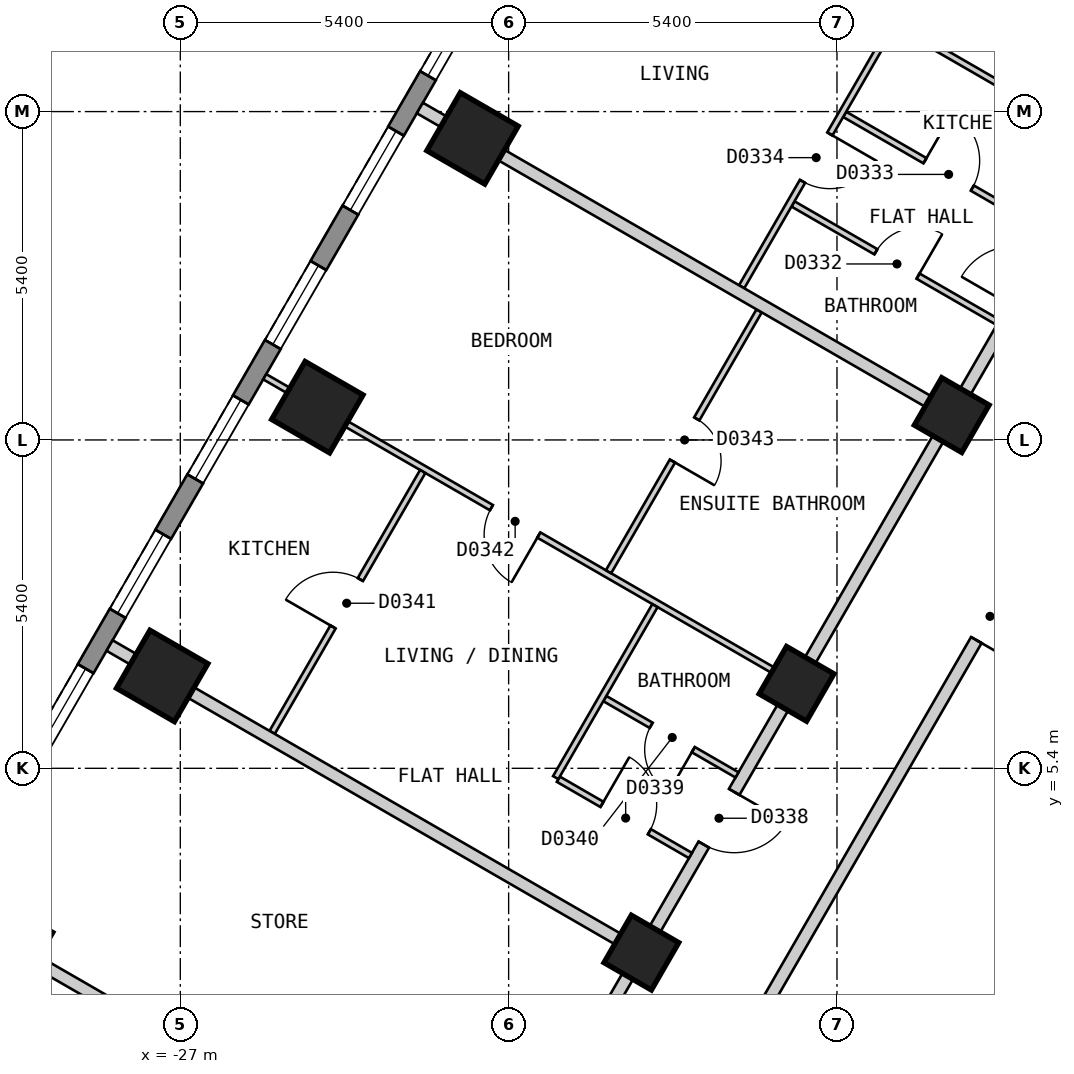
"""IFC4 building model, lengths in metres.
Left out: names, types, materials, properties, quantities, classifications, styles, units other than length and angle.
Written with IfcOpenShell. Run it as: python <this file> out.ifc"""

import sys

from ifc_helpers import new_model, si_unit, direction, frame, frame_2d, origin, origin_2d, place, context, subcontext, project, spatial, polyline, rectangle, outline, extrude, element, fill, save


model = new_model("IFC4")
c1 = context("Model", 3, precision=1e-05, world=origin(), true_north=direction((0.0, 1.0)))
c2 = subcontext(c1, "Body", "Model", "MODEL_VIEW")
j1 = project(units=[si_unit("LENGTHUNIT", "METRE"), si_unit("PLANEANGLEUNIT", "RADIAN")], contexts=[c1])
p1 = place(None, origin())
s1 = spatial("IfcSite", under=j1, at=p1, CompositionType="ELEMENT")
p2 = place(p1, origin())
s2 = spatial("IfcBuilding", under=s1, at=p2, CompositionType="ELEMENT")
p3 = place(p2, frame((0.0, 0.0, 59.4)))
s3 = spatial("IfcBuildingStorey", under=s2, at=p3, CompositionType="ELEMENT", Elevation=59.4)
for number, where, z_axis, x_axis in (
    (1, (-22.194, 15.759, 0.0), (0.0, 0.0, 1.0), (-0.5, -0.866, 0.0)),
    (2, (-24.746, 11.339, 0.0), (0.0, 0.0, 1.0), (-0.5, -0.866, 0.0)),
    (3, (-27.298, 6.919, 0.0), (0.0, 0.0, 1.0), (-0.5, -0.866, 0.0)),
    (4, (-29.849, 2.499, 0.0), (0.0, 0.0, 1.0), (-0.5, -0.866, 0.0)),
):
    element("IfcColumn", number, at=place(p3, frame(where, z_axis=z_axis, x_axis=x_axis)), inside=s3, PredefinedType="COLUMN", context=c2, shape_type="SweptSolid", body=[
        extrude(rectangle(XDim=1.1, YDim=1.1, at=origin_2d()), origin(), (0.0, 0.0, 1.0), 3.0),
    ])
for number, where, z_axis, x_axis in (
    (5, (-14.313, 11.209, 0.0), (0.0, 0.0, 1.0), (-0.5, -0.866, 0.0)),
    (6, (-16.865, 6.789, 0.0), (0.0, 0.0, 1.0), (-0.5, -0.866, 0.0)),
    (7, (-19.417, 2.369, 0.0), (0.0, 0.0, 1.0), (-0.5, -0.866, 0.0)),
):
    element("IfcColumn", number, at=place(p3, frame(where, z_axis=z_axis, x_axis=x_axis)), inside=s3, PredefinedType="COLUMN", context=c2, shape_type="SweptSolid", body=[
        extrude(rectangle(XDim=0.9, YDim=0.9, at=origin_2d()), origin(), (0.0, 0.0, 1.0), 3.0),
    ])
p4 = place(p3, frame((-17.71, 25.825, 0.0), z_axis=(0.0, 0.0, 1.0), x_axis=(-0.500001938803, -0.866024284413, 0.0)))
e8 = element("IfcWall", 8, at=p4, inside=s3, PredefinedType="SOLIDWALL", context=c2, shape_type="SweptSolid", body=[
    extrude(outline(polyline([(0.0, -0.15), (27.02, -0.15), (26.94, 0.15), (0.08, 0.15), (0.0, -0.15)])), origin(), (0.0, 0.0, 1.0), 2.6),
])
p5 = place(p4, frame((1.277, 0.0, 0.15)))
e9 = element("IfcOpeningElement", 9, at=p5, cuts=e8, PredefinedType="OPENING", context=c2, shape_type="SweptSolid", body=[
    extrude(rectangle(XDim=1.5, YDim=2.1, at=frame_2d((0.75, 1.05))), frame((0.0, 0.16, 0.0), z_axis=(0.0, -1.0, 0.0), x_axis=(1.0, 0.0, 0.0)), (0.0, 0.0, 1.0), 0.32),
])
p6 = place(p4, frame((3.829, 0.0, 0.15)))
e10 = element("IfcOpeningElement", 10, at=p6, cuts=e8, PredefinedType="OPENING", context=c2, shape_type="SweptSolid", body=[
    extrude(rectangle(XDim=1.5, YDim=2.1, at=frame_2d((0.75, 1.05))), frame((0.0, 0.16, 0.0), z_axis=(0.0, -1.0, 0.0), x_axis=(1.0, 0.0, 0.0)), (0.0, 0.0, 1.0), 0.32),
])
p7 = place(p4, frame((6.382, 0.0, 0.15)))
e11 = element("IfcOpeningElement", 11, at=p7, cuts=e8, PredefinedType="OPENING", context=c2, shape_type="SweptSolid", body=[
    extrude(rectangle(XDim=1.5, YDim=2.1, at=frame_2d((0.75, 1.05))), frame((0.0, 0.16, 0.0), z_axis=(0.0, -1.0, 0.0), x_axis=(1.0, 0.0, 0.0)), (0.0, 0.0, 1.0), 0.32),
])
p8 = place(p4, frame((8.933, 0.0, 0.15)))
e12 = element("IfcOpeningElement", 12, at=p8, cuts=e8, PredefinedType="OPENING", context=c2, shape_type="SweptSolid", body=[
    extrude(rectangle(XDim=1.5, YDim=2.1, at=frame_2d((0.75, 1.05))), frame((0.0, 0.16, 0.0), z_axis=(0.0, -1.0, 0.0), x_axis=(1.0, 0.0, 0.0)), (0.0, 0.0, 1.0), 0.32),
])
p9 = place(p4, frame((11.485, 0.0, 0.15)))
e13 = element("IfcOpeningElement", 13, at=p9, cuts=e8, PredefinedType="OPENING", context=c2, shape_type="SweptSolid", body=[
    extrude(rectangle(XDim=1.5, YDim=2.1, at=frame_2d((0.75, 1.05))), frame((0.0, 0.16, 0.0), z_axis=(0.0, -1.0, 0.0), x_axis=(1.0, 0.0, 0.0)), (0.0, 0.0, 1.0), 0.32),
])
p10 = place(p4, frame((14.037, 0.0, 0.15)))
e14 = element("IfcOpeningElement", 14, at=p10, cuts=e8, PredefinedType="OPENING", context=c2, shape_type="SweptSolid", body=[
    extrude(rectangle(XDim=1.5, YDim=2.1, at=frame_2d((0.75, 1.05))), frame((0.0, 0.16, 0.0), z_axis=(0.0, -1.0, 0.0), x_axis=(1.0, 0.0, 0.0)), (0.0, 0.0, 1.0), 0.32),
])
p11 = place(p4, frame((16.589, 0.0, 0.15)))
e15 = element("IfcOpeningElement", 15, at=p11, cuts=e8, PredefinedType="OPENING", context=c2, shape_type="SweptSolid", body=[
    extrude(rectangle(XDim=1.5, YDim=2.1, at=frame_2d((0.75, 1.05))), frame((0.0, 0.16, 0.0), z_axis=(0.0, -1.0, 0.0), x_axis=(1.0, 0.0, 0.0)), (0.0, 0.0, 1.0), 0.32),
])
p12 = place(p4, frame((19.141, 0.0, 0.15)))
e16 = element("IfcOpeningElement", 16, at=p12, cuts=e8, PredefinedType="OPENING", context=c2, shape_type="SweptSolid", body=[
    extrude(rectangle(XDim=1.5, YDim=2.1, at=frame_2d((0.75, 1.05))), frame((0.0, 0.16, 0.0), z_axis=(0.0, -1.0, 0.0), x_axis=(1.0, 0.0, 0.0)), (0.0, 0.0, 1.0), 0.32),
])
p13 = place(p4, frame((21.693, 0.0, 0.15)))
e17 = element("IfcOpeningElement", 17, at=p13, cuts=e8, PredefinedType="OPENING", context=c2, shape_type="SweptSolid", body=[
    extrude(rectangle(XDim=1.5, YDim=2.1, at=frame_2d((0.75, 1.05))), frame((0.0, 0.16, 0.0), z_axis=(0.0, -1.0, 0.0), x_axis=(1.0, 0.0, 0.0)), (0.0, 0.0, 1.0), 0.32),
])
p14 = place(p4, frame((24.244, 0.0, 0.15)))
e18 = element("IfcOpeningElement", 18, at=p14, cuts=e8, PredefinedType="OPENING", context=c2, shape_type="SweptSolid", body=[
    extrude(rectangle(XDim=1.5, YDim=2.1, at=frame_2d((0.75, 1.05))), frame((0.0, 0.16, 0.0), z_axis=(0.0, -1.0, 0.0), x_axis=(1.0, 0.0, 0.0)), (0.0, 0.0, 1.0), 0.32),
])
p15 = place(p3, frame((-18.244, -0.001, 0.0), z_axis=(0.0, 0.0, 1.0), x_axis=(0.499962999376, 0.866046765051, 0.0)))
e19 = element("IfcWall", 19, at=p15, inside=s3, PredefinedType="PARTITIONING", context=c2, shape_type="SweptSolid", body=[
    extrude(rectangle(XDim=18.245, YDim=0.2, at=frame_2d((9.123, 0.0))), origin(), (0.0, 0.0, 1.0), 2.6),
])
p16 = place(p15, frame((8.672, 0.0, 0.0)))
e20 = element("IfcOpeningElement", 20, at=p16, cuts=e19, PredefinedType="OPENING", context=c2, shape_type="SweptSolid", body=[
    extrude(rectangle(XDim=0.9, YDim=2.1, at=frame_2d((0.45, 1.05))), frame((0.0, 0.11, 0.0), z_axis=(0.0, -1.0, 0.0), x_axis=(1.0, 0.0, 0.0)), (0.0, 0.0, 1.0), 0.22),
])
p17 = place(p3, frame((-20.727, 0.099, 0.0), z_axis=(0.0, 0.0, 1.0), x_axis=(0.499993204491, 0.866029327138, 0.0)))
e21 = element("IfcWall", 21, at=p17, inside=s3, PredefinedType="PARTITIONING", context=c2, shape_type="SweptSolid", body=[
    extrude(rectangle(XDim=20.554, YDim=0.2, at=frame_2d((10.277, 0.0))), origin(), (0.0, 0.0, 1.0), 2.6),
])
p18 = place(p17, frame((14.88, 0.0, 0.0)))
e22 = element("IfcOpeningElement", 22, at=p18, cuts=e21, PredefinedType="OPENING", context=c2, shape_type="SweptSolid", body=[
    extrude(rectangle(XDim=1.0, YDim=2.1, at=frame_2d((0.5, 1.05))), frame((0.0, 0.11, 0.0), z_axis=(0.0, -1.0, 0.0), x_axis=(1.0, 0.0, 0.0)), (0.0, 0.0, 1.0), 0.22),
])
p19 = place(p17, frame((4.673, 0.0, 0.0)))
e23 = element("IfcOpeningElement", 23, at=p19, cuts=e21, PredefinedType="OPENING", context=c2, shape_type="SweptSolid", body=[
    extrude(rectangle(XDim=1.0, YDim=2.1, at=frame_2d((0.5, 1.05))), frame((0.0, 0.11, 0.0), z_axis=(0.0, -1.0, 0.0), x_axis=(1.0, 0.0, 0.0)), (0.0, 0.0, 1.0), 0.22),
])
p20 = place(p17, frame((0.838, 0.0, 0.0)))
e24 = element("IfcOpeningElement", 24, at=p20, cuts=e21, PredefinedType="OPENING", context=c2, shape_type="SweptSolid", body=[
    extrude(rectangle(XDim=0.8, YDim=2.1, at=frame_2d((0.4, 1.05))), frame((0.0, 0.11, 0.0), z_axis=(0.0, -1.0, 0.0), x_axis=(1.0, 0.0, 0.0)), (0.0, 0.0, 1.0), 0.22),
])
p21 = place(p3, frame((-20.018, 6.547, 0.0), z_axis=(0.0, 0.0, 1.0), x_axis=(0.866038211682, -0.499977815414, 0.0)))
e25 = element("IfcWall", 25, at=p21, inside=s3, PredefinedType="PARTITIONING", context=c2, shape_type="SweptSolid", body=[
    extrude(rectangle(XDim=2.51, YDim=0.1, at=frame_2d((1.255, 0.0))), origin(), (0.0, 0.0, 1.0), 2.6),
])
p22 = place(p21, frame((0.88, 0.0, 0.0)))
e26 = element("IfcOpeningElement", 26, at=p22, cuts=e25, PredefinedType="OPENING", context=c2, shape_type="SweptSolid", body=[
    extrude(rectangle(XDim=0.8, YDim=2.1, at=frame_2d((0.4, 1.05))), frame((0.0, 0.06, 0.0), z_axis=(0.0, -1.0, 0.0), x_axis=(1.0, 0.0, 0.0)), (0.0, 0.0, 1.0), 0.12),
])
p23 = place(p3, frame((-20.783, 5.221, 0.0), z_axis=(0.0, 0.0, 1.0), x_axis=(0.865958718457, -0.500115484592, 0.0)))
e27 = element("IfcWall", 27, at=p23, inside=s3, PredefinedType="PARTITIONING", context=c2, shape_type="SweptSolid", body=[
    extrude(rectangle(XDim=2.509, YDim=0.1, at=frame_2d((1.255, 0.0))), origin(), (0.0, 0.0, 1.0), 2.6),
])
p24 = place(p23, frame((0.829, 0.0, 0.0)))
e28 = element("IfcOpeningElement", 28, at=p24, cuts=e27, PredefinedType="OPENING", context=c2, shape_type="SweptSolid", body=[
    extrude(rectangle(XDim=0.9, YDim=2.1, at=frame_2d((0.45, 1.05))), frame((0.0, 0.06, 0.0), z_axis=(0.0, -1.0, 0.0), x_axis=(1.0, 0.0, 0.0)), (0.0, 0.0, 1.0), 0.12),
])
p25 = place(p3, frame((-25.611, 11.839, 0.0), z_axis=(0.0, 0.0, 1.0), x_axis=(0.866022959057, -0.500004234368, 0.0)))
e29 = element("IfcWall", 29, at=p25, inside=s3, PredefinedType="PARTITIONING", context=c2, shape_type="SweptSolid", body=[
    extrude(rectangle(XDim=10.0, YDim=0.1, at=frame_2d((5.0, 0.0))), origin(), (0.0, 0.0, 1.0), 2.6),
])
p26 = place(p25, frame((4.305, 0.0, 0.0)))
e30 = element("IfcOpeningElement", 30, at=p26, cuts=e29, PredefinedType="OPENING", context=c2, shape_type="SweptSolid", body=[
    extrude(rectangle(XDim=0.9, YDim=2.1, at=frame_2d((0.45, 1.05))), frame((0.0, 0.06, 0.0), z_axis=(0.0, -1.0, 0.0), x_axis=(1.0, 0.0, 0.0)), (0.0, 0.0, 1.0), 0.12),
])
p27 = place(p3, frame((-16.923, 14.681, 0.0), z_axis=(0.0, 0.0, 1.0), x_axis=(0.866087525071, -0.499892387336, 0.0)))
e31 = element("IfcWall", 31, at=p27, inside=s3, PredefinedType="PARTITIONING", context=c2, shape_type="SweptSolid", body=[
    extrude(rectangle(XDim=3.897, YDim=0.1, at=frame_2d((1.948, 0.0))), origin(), (0.0, 0.0, 1.0), 2.6),
])
p28 = place(p27, frame((1.574, 0.0, 0.0)))
e32 = element("IfcOpeningElement", 32, at=p28, cuts=e31, PredefinedType="OPENING", context=c2, shape_type="SweptSolid", body=[
    extrude(rectangle(XDim=0.8, YDim=2.1, at=frame_2d((0.4, 1.05))), frame((0.0, 0.06, 0.0), z_axis=(0.0, -1.0, 0.0), x_axis=(1.0, 0.0, 0.0)), (0.0, 0.0, 1.0), 0.12),
])
p29 = place(p3, frame((-16.073, 16.154, 0.0), z_axis=(0.0, 0.0, 1.0), x_axis=(0.865979019114, -0.500080332001, 0.0)))
e33 = element("IfcWall", 33, at=p29, inside=s3, PredefinedType="PARTITIONING", context=c2, shape_type="SweptSolid", body=[
    extrude(rectangle(XDim=3.897, YDim=0.1, at=frame_2d((1.949, 0.0))), origin(), (0.0, 0.0, 1.0), 2.6),
])
p30 = place(p29, frame((1.524, 0.0, 0.0)))
e34 = element("IfcOpeningElement", 34, at=p30, cuts=e33, PredefinedType="OPENING", context=c2, shape_type="SweptSolid", body=[
    extrude(rectangle(XDim=0.9, YDim=2.1, at=frame_2d((0.45, 1.05))), frame((0.0, 0.06, 0.0), z_axis=(0.0, -1.0, 0.0), x_axis=(1.0, 0.0, 0.0)), (0.0, 0.0, 1.0), 0.12),
])
p31 = place(p3, frame((-20.508, 20.679, 0.0), z_axis=(0.0, 0.0, 1.0), x_axis=(0.866047370643, -0.499961950354, 0.0)))
e35 = element("IfcWall", 35, at=p31, inside=s3, PredefinedType="PARTITIONING", context=c2, shape_type="SweptSolid", body=[
    extrude(rectangle(XDim=10.001, YDim=0.1, at=frame_2d((5.0, 0.0))), origin(), (0.0, 0.0, 1.0), 2.6),
])
p32 = place(p31, frame((2.576, 0.0, 0.0)))
e36 = element("IfcOpeningElement", 36, at=p32, cuts=e35, PredefinedType="OPENING", context=c2, shape_type="SweptSolid", body=[
    extrude(rectangle(XDim=0.9, YDim=2.1, at=frame_2d((0.45, 1.05))), frame((0.0, 0.06, 0.0), z_axis=(0.0, -1.0, 0.0), x_axis=(1.0, 0.0, 0.0)), (0.0, 0.0, 1.0), 0.12),
])
p33 = place(p3, frame((-20.826, 5.247, 0.0), z_axis=(0.0, 0.0, 1.0), x_axis=(0.499806605897, 0.866137031134, 0.0)))
e37 = element("IfcWall", 37, at=p33, inside=s3, PredefinedType="PARTITIONING", context=c2, shape_type="SweptSolid", body=[
    extrude(rectangle(XDim=3.265, YDim=0.1, at=frame_2d((1.632, 0.0))), origin(), (0.0, 0.0, 1.0), 2.6),
])
p34 = place(p3, frame((-19.957, 8.633, 0.0), z_axis=(0.0, 0.0, 1.0), x_axis=(0.499967111503, 0.866044391134, 0.0)))
e38 = element("IfcWall", 38, at=p34, inside=s3, PredefinedType="PARTITIONING", context=c2, shape_type="SweptSolid", body=[
    extrude(rectangle(XDim=4.952, YDim=0.1, at=frame_2d((2.476, 0.0))), origin(), (0.0, 0.0, 1.0), 2.6),
])
p35 = place(p34, frame((2.102, 0.0, 0.0)))
e39 = element("IfcOpeningElement", 39, at=p35, cuts=e38, PredefinedType="OPENING", context=c2, shape_type="SweptSolid", body=[
    extrude(rectangle(XDim=0.8, YDim=2.1, at=frame_2d((0.4, 1.05))), frame((0.0, 0.06, 0.0), z_axis=(0.0, -1.0, 0.0), x_axis=(1.0, 0.0, 0.0)), (0.0, 0.0, 1.0), 0.12),
])
p36 = place(p3, frame((-17.768, 13.319, 0.0), z_axis=(0.0, 0.0, 1.0), x_axis=(0.499958946799, 0.866049104564, 0.0)))
e40 = element("IfcWall", 40, at=p36, inside=s3, PredefinedType="PARTITIONING", context=c2, shape_type="SweptSolid", body=[
    extrude(rectangle(XDim=5.004, YDim=0.1, at=frame_2d((2.502, 0.0))), origin(), (0.0, 0.0, 1.0), 2.6),
])
p37 = place(p36, frame((2.002, 0.0, 0.0)))
e41 = element("IfcOpeningElement", 41, at=p37, cuts=e40, PredefinedType="OPENING", context=c2, shape_type="SweptSolid", body=[
    extrude(rectangle(XDim=0.9, YDim=2.1, at=frame_2d((0.45, 1.05))), frame((0.0, 0.06, 0.0), z_axis=(0.0, -1.0, 0.0), x_axis=(1.0, 0.0, 0.0)), (0.0, 0.0, 1.0), 0.12),
])
p38 = place(p3, frame((-25.489, 5.991, 0.0), z_axis=(0.0, 0.0, 1.0), x_axis=(0.499881743012, 0.866093668724, 0.0)))
e42 = element("IfcWall", 42, at=p38, inside=s3, PredefinedType="PARTITIONING", context=c2, shape_type="SweptSolid", body=[
    extrude(rectangle(XDim=4.953, YDim=0.1, at=frame_2d((2.477, 0.0))), origin(), (0.0, 0.0, 1.0), 2.6),
])
p39 = place(p38, frame((2.002, 0.0, 0.0)))
e43 = element("IfcOpeningElement", 43, at=p39, cuts=e42, PredefinedType="OPENING", context=c2, shape_type="SweptSolid", body=[
    extrude(rectangle(XDim=0.9, YDim=2.1, at=frame_2d((0.45, 1.05))), frame((0.0, 0.06, 0.0), z_axis=(0.0, -1.0, 0.0), x_axis=(1.0, 0.0, 0.0)), (0.0, 0.0, 1.0), 0.12),
])
p40 = place(p3, frame((-28.163, 7.419, 0.0), z_axis=(0.0, 0.0, 1.0), x_axis=(0.866022959057, -0.500004234368, 0.0)))
e44 = element("IfcWall", 44, at=p40, inside=s3, PredefinedType="PARTITIONING", context=c2, shape_type="SweptSolid", body=[
    extrude(rectangle(XDim=10.0, YDim=0.2, at=frame_2d((5.0, 0.0))), origin(), (0.0, 0.0, 1.0), 2.6),
])
p41 = place(p3, frame((-30.716, 2.999, 0.0), z_axis=(0.0, 0.0, 1.0), x_axis=(0.866032775405, -0.499987231761, 0.0)))
e45 = element("IfcWall", 45, at=p41, inside=s3, PredefinedType="PARTITIONING", context=c2, shape_type="SweptSolid", body=[
    extrude(rectangle(XDim=5.8, YDim=0.2, at=frame_2d((2.9, 0.0))), origin(), (0.0, 0.0, 1.0), 2.6),
])
p42 = place(p3, frame((-23.06, 16.259, 0.0), z_axis=(0.0, 0.0, 1.0), x_axis=(0.866047370643, -0.499961950354, 0.0)))
e46 = element("IfcWall", 46, at=p42, inside=s3, PredefinedType="PARTITIONING", context=c2, shape_type="SweptSolid", body=[
    extrude(rectangle(XDim=10.001, YDim=0.2, at=frame_2d((5.0, 0.0))), origin(), (0.0, 0.0, 1.0), 2.6),
])
p43 = place(p8, origin())
e47 = element("IfcWindow", 47, at=p43, inside=s3, PartitioningType="SINGLE_PANEL", PredefinedType="WINDOW", context=c2, shape_type="SweptSolid", body=[
    extrude(rectangle(XDim=1.5, YDim=2.1, at=frame_2d((0.75, 1.05))), frame((0.0, 0.03, 0.0), z_axis=(0.0, -1.0, 0.0), x_axis=(1.0, 0.0, 0.0)), (0.0, 0.0, 1.0), 0.06),
])
fill(e12, e47)
p44 = place(p9, origin())
e48 = element("IfcWindow", 48, at=p44, inside=s3, PartitioningType="SINGLE_PANEL", PredefinedType="WINDOW", context=c2, shape_type="SweptSolid", body=[
    extrude(rectangle(XDim=1.5, YDim=2.1, at=frame_2d((0.75, 1.05))), frame((0.0, 0.03, 0.0), z_axis=(0.0, -1.0, 0.0), x_axis=(1.0, 0.0, 0.0)), (0.0, 0.0, 1.0), 0.06),
])
fill(e13, e48)
p45 = place(p10, origin())
e49 = element("IfcWindow", 49, at=p45, inside=s3, PartitioningType="SINGLE_PANEL", PredefinedType="WINDOW", context=c2, shape_type="SweptSolid", body=[
    extrude(rectangle(XDim=1.5, YDim=2.1, at=frame_2d((0.75, 1.05))), frame((0.0, 0.03, 0.0), z_axis=(0.0, -1.0, 0.0), x_axis=(1.0, 0.0, 0.0)), (0.0, 0.0, 1.0), 0.06),
])
fill(e14, e49)
p46 = place(p11, origin())
e50 = element("IfcWindow", 50, at=p46, inside=s3, PartitioningType="SINGLE_PANEL", PredefinedType="WINDOW", context=c2, shape_type="SweptSolid", body=[
    extrude(rectangle(XDim=1.5, YDim=2.1, at=frame_2d((0.75, 1.05))), frame((0.0, 0.03, 0.0), z_axis=(0.0, -1.0, 0.0), x_axis=(1.0, 0.0, 0.0)), (0.0, 0.0, 1.0), 0.06),
])
fill(e15, e50)
p47 = place(p12, origin())
e51 = element("IfcWindow", 51, at=p47, inside=s3, PartitioningType="SINGLE_PANEL", PredefinedType="WINDOW", context=c2, shape_type="SweptSolid", body=[
    extrude(rectangle(XDim=1.5, YDim=2.1, at=frame_2d((0.75, 1.05))), frame((0.0, 0.03, 0.0), z_axis=(0.0, -1.0, 0.0), x_axis=(1.0, 0.0, 0.0)), (0.0, 0.0, 1.0), 0.06),
])
fill(e16, e51)
p48 = place(p13, origin())
e52 = element("IfcWindow", 52, at=p48, inside=s3, PartitioningType="SINGLE_PANEL", PredefinedType="WINDOW", context=c2, shape_type="SweptSolid", body=[
    extrude(rectangle(XDim=1.5, YDim=2.1, at=frame_2d((0.75, 1.05))), frame((0.0, 0.03, 0.0), z_axis=(0.0, -1.0, 0.0), x_axis=(1.0, 0.0, 0.0)), (0.0, 0.0, 1.0), 0.06),
])
fill(e17, e52)
p49 = place(p28, origin())
e53 = element("IfcDoor", 53, at=p49, inside=s3, OperationType="SINGLE_SWING_RIGHT", PredefinedType="DOOR", context=c2, shape_type="SweptSolid", body=[
    extrude(rectangle(XDim=0.8, YDim=2.1, at=frame_2d((0.4, 1.05))), frame((0.0, 0.025, 0.0), z_axis=(0.0, -1.0, 0.0), x_axis=(1.0, 0.0, 0.0)), (0.0, 0.0, 1.0), 0.05),
])
fill(e32, e53)
p50 = place(p30, origin())
e54 = element("IfcDoor", 54, at=p50, inside=s3, OperationType="SINGLE_SWING_LEFT", PredefinedType="DOOR", context=c2, shape_type="SweptSolid", body=[
    extrude(rectangle(XDim=0.9, YDim=2.1, at=frame_2d((0.45, 1.05))), frame((0.0, 0.025, 0.0), z_axis=(0.0, -1.0, 0.0), x_axis=(1.0, 0.0, 0.0)), (0.0, 0.0, 1.0), 0.05),
])
fill(e34, e54)
p51 = place(p37, origin())
e55 = element("IfcDoor", 55, at=p51, inside=s3, OperationType="SINGLE_SWING_RIGHT", PredefinedType="DOOR", context=c2, shape_type="SweptSolid", body=[
    extrude(rectangle(XDim=0.9, YDim=2.1, at=frame_2d((0.45, 1.05))), frame((0.0, 0.025, 0.0), z_axis=(0.0, -1.0, 0.0), x_axis=(1.0, 0.0, 0.0)), (0.0, 0.0, 1.0), 0.05),
])
fill(e41, e55)
p52 = place(p19, origin())
e56 = element("IfcDoor", 56, at=p52, inside=s3, OperationType="SINGLE_SWING_RIGHT", PredefinedType="DOOR", context=c2, shape_type="SweptSolid", body=[
    extrude(rectangle(XDim=1.0, YDim=2.1, at=frame_2d((0.5, 1.05))), frame((0.0, 0.025, 0.0), z_axis=(0.0, -1.0, 0.0), x_axis=(1.0, 0.0, 0.0)), (0.0, 0.0, 1.0), 0.05),
])
fill(e23, e56)
p53 = place(p24, origin())
e57 = element("IfcDoor", 57, at=p53, inside=s3, OperationType="SINGLE_SWING_LEFT", PredefinedType="DOOR", context=c2, shape_type="SweptSolid", body=[
    extrude(rectangle(XDim=0.9, YDim=2.1, at=frame_2d((0.45, 1.05))), frame((0.0, 0.025, 0.0), z_axis=(0.0, -1.0, 0.0), x_axis=(1.0, 0.0, 0.0)), (0.0, 0.0, 1.0), 0.05),
])
fill(e28, e57)
p54 = place(p22, origin())
e58 = element("IfcDoor", 58, at=p54, inside=s3, OperationType="SINGLE_SWING_RIGHT", PredefinedType="DOOR", context=c2, shape_type="SweptSolid", body=[
    extrude(rectangle(XDim=0.8, YDim=2.1, at=frame_2d((0.4, 1.05))), frame((0.0, 0.025, 0.0), z_axis=(0.0, -1.0, 0.0), x_axis=(1.0, 0.0, 0.0)), (0.0, 0.0, 1.0), 0.05),
])
fill(e26, e58)
p55 = place(p39, origin())
e59 = element("IfcDoor", 59, at=p55, inside=s3, OperationType="SINGLE_SWING_LEFT", PredefinedType="DOOR", context=c2, shape_type="SweptSolid", body=[
    extrude(rectangle(XDim=0.9, YDim=2.1, at=frame_2d((0.45, 1.05))), frame((0.0, 0.025, 0.0), z_axis=(0.0, -1.0, 0.0), x_axis=(1.0, 0.0, 0.0)), (0.0, 0.0, 1.0), 0.05),
])
fill(e43, e59)
p56 = place(p26, origin())
e60 = element("IfcDoor", 60, at=p56, inside=s3, OperationType="SINGLE_SWING_RIGHT", PredefinedType="DOOR", context=c2, shape_type="SweptSolid", body=[
    extrude(rectangle(XDim=0.9, YDim=2.1, at=frame_2d((0.45, 1.05))), frame((0.0, 0.025, 0.0), z_axis=(0.0, -1.0, 0.0), x_axis=(1.0, 0.0, 0.0)), (0.0, 0.0, 1.0), 0.05),
])
fill(e30, e60)
p57 = place(p35, origin())
e61 = element("IfcDoor", 61, at=p57, inside=s3, OperationType="SINGLE_SWING_LEFT", PredefinedType="DOOR", context=c2, shape_type="SweptSolid", body=[
    extrude(rectangle(XDim=0.8, YDim=2.1, at=frame_2d((0.4, 1.05))), frame((0.0, 0.025, 0.0), z_axis=(0.0, -1.0, 0.0), x_axis=(1.0, 0.0, 0.0)), (0.0, 0.0, 1.0), 0.05),
])
fill(e39, e61)
p58 = place(p16, origin())
e62 = element("IfcDoor", 62, at=p58, inside=s3, OperationType="SINGLE_SWING_LEFT", PredefinedType="DOOR", context=c2, shape_type="SweptSolid", body=[
    extrude(rectangle(XDim=0.9, YDim=2.1, at=frame_2d((0.45, 1.05))), frame((0.0, 0.025, 0.0), z_axis=(0.0, -1.0, 0.0), x_axis=(1.0, 0.0, 0.0)), (0.0, 0.0, 1.0), 0.05),
])
fill(e20, e62)
save(model, sys.argv[1])
